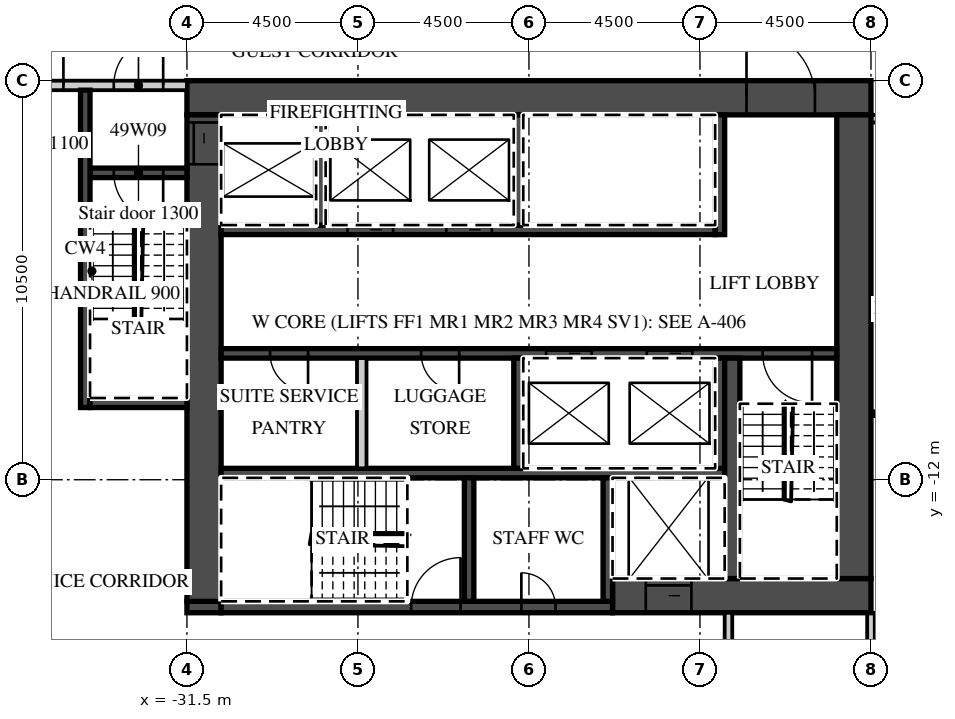
"""IFC4 building model, lengths in metres.
Left out: names, types, materials, properties, quantities, classifications, styles, units other than length and angle.
Written with IfcOpenShell. Run it as: python <this file> out.ifc"""

import sys

from ifc_helpers import new_model, si_unit, direction, frame, frame_2d, origin, place, context, subcontext, project, spatial, rectangle, extrude, element, fill, save


model = new_model("IFC4")
c1 = context("Model", 3, precision=1e-05, world=origin(), true_north=direction((0.0, 1.0)))
c2 = subcontext(c1, "Body", "Model", "MODEL_VIEW")
j1 = project(units=[si_unit("LENGTHUNIT", "METRE"), si_unit("PLANEANGLEUNIT", "RADIAN")], contexts=[c1])
p1 = place(None, origin())
s1 = spatial("IfcSite", under=j1, at=p1, CompositionType="ELEMENT")
p2 = place(p1, origin())
s2 = spatial("IfcBuilding", under=s1, at=p2, CompositionType="ELEMENT")
p3 = place(p2, frame((0.0, 0.0, 203.2)))
s3 = spatial("IfcBuildingStorey", under=s2, at=p3, CompositionType="ELEMENT", Elevation=203.2)
p4 = place(p3, frame((-13.5, -22.3, 0.0), z_axis=(0.0, 0.0, 1.0), x_axis=(0.0, 1.0, 0.0)))
e1 = element("IfcWall", 1, at=p4, inside=s3, PredefinedType="PARTITIONING", context=c2, shape_type="SweptSolid", body=[
    extrude(rectangle(XDim=6.8, YDim=0.2, at=frame_2d((3.4, 0.0))), origin(), (0.0, 0.0, 1.0), 3.0),
])
p5 = place(p3, frame((-13.5, -2.5, 0.0), z_axis=(0.0, 0.0, 1.0), x_axis=(1.0, 0.0, 0.0)))
e2 = element("IfcWall", 2, at=p5, inside=s3, PredefinedType="PARTITIONING", context=c2, shape_type="SweptSolid", body=[
    extrude(rectangle(XDim=27.0, YDim=0.2, at=frame_2d((13.5, 0.0))), origin(), (0.0, 0.0, 1.0), 3.0),
])
p6 = place(p5, frame((2.925, 0.0, 0.0)))
e3 = element("IfcOpeningElement", 3, at=p6, cuts=e2, PredefinedType="OPENING", context=c2, shape_type="SweptSolid", body=[
    extrude(rectangle(XDim=1.0, YDim=2.1, at=frame_2d((0.5, 1.05))), frame((0.0, 0.11, 0.0), z_axis=(0.0, -1.0, 0.0), x_axis=(1.0, 0.0, 0.0)), (0.0, 0.0, 1.0), 0.22),
])
p7 = place(p5, frame((5.075, 0.0, 0.0)))
e4 = element("IfcOpeningElement", 4, at=p7, cuts=e2, PredefinedType="OPENING", context=c2, shape_type="SweptSolid", body=[
    extrude(rectangle(XDim=1.0, YDim=2.1, at=frame_2d((0.5, 1.05))), frame((0.0, 0.11, 0.0), z_axis=(0.0, -1.0, 0.0), x_axis=(1.0, 0.0, 0.0)), (0.0, 0.0, 1.0), 0.22),
])
p8 = place(p5, frame((11.925, 0.0, 0.0)))
e5 = element("IfcOpeningElement", 5, at=p8, cuts=e2, PredefinedType="OPENING", context=c2, shape_type="SweptSolid", body=[
    extrude(rectangle(XDim=1.0, YDim=2.1, at=frame_2d((0.5, 1.05))), frame((0.0, 0.11, 0.0), z_axis=(0.0, -1.0, 0.0), x_axis=(1.0, 0.0, 0.0)), (0.0, 0.0, 1.0), 0.22),
])
p9 = place(p5, frame((15.938, 0.0, 0.0)))
e6 = element("IfcOpeningElement", 6, at=p9, cuts=e2, PredefinedType="OPENING", context=c2, shape_type="SweptSolid", body=[
    extrude(rectangle(XDim=1.2, YDim=2.1, at=frame_2d((0.6, 1.05))), frame((0.0, 0.11, 0.0), z_axis=(0.0, -1.0, 0.0), x_axis=(1.0, 0.0, 0.0)), (0.0, 0.0, 1.0), 0.22),
])
p10 = place(p5, frame((25.425, 0.0, 0.0)))
e7 = element("IfcOpeningElement", 7, at=p10, cuts=e2, PredefinedType="OPENING", context=c2, shape_type="SweptSolid", body=[
    extrude(rectangle(XDim=1.0, YDim=2.1, at=frame_2d((0.5, 1.05))), frame((0.0, 0.11, 0.0), z_axis=(0.0, -1.0, 0.0), x_axis=(1.0, 0.0, 0.0)), (0.0, 0.0, 1.0), 0.22),
])
p11 = place(p3, frame((-31.5, -1.95, 0.0), z_axis=(0.0, 0.0, 1.0), x_axis=(1.0, 0.0, 0.0)))
e8 = element("IfcWall", 8, at=p11, inside=s3, PredefinedType="SHEAR", context=c2, shape_type="SweptSolid", body=[
    extrude(rectangle(XDim=18.0, YDim=0.9, at=frame_2d((9.0, 0.0))), origin(), (0.0, 0.0, 1.0), 3.0),
])
p12 = place(p11, frame((14.725, 0.0, 0.0)))
e9 = element("IfcOpeningElement", 9, at=p12, cuts=e8, PredefinedType="OPENING", context=c2, shape_type="SweptSolid", body=[
    extrude(rectangle(XDim=1.8, YDim=2.1, at=frame_2d((0.9, 1.05))), frame((0.0, 0.46, 0.0), z_axis=(0.0, -1.0, 0.0), x_axis=(1.0, 0.0, 0.0)), (0.0, 0.0, 1.0), 0.92),
])
p13 = place(p3, frame((-20.3, -15.05, 0.0), z_axis=(0.0, 0.0, 1.0), x_axis=(1.0, 0.0, 0.0)))
e10 = element("IfcWall", 10, at=p13, inside=s3, PredefinedType="SHEAR", context=c2, shape_type="SweptSolid", body=[
    extrude(rectangle(XDim=6.8, YDim=0.9, at=frame_2d((3.4, 0.0))), origin(), (0.0, 0.0, 1.0), 3.0),
])
p14 = place(p13, frame((0.875, 0.0, 0.0)))
e11 = element("IfcOpeningElement", 11, at=p14, cuts=e10, PredefinedType="OPENING", context=c2, shape_type="SweptSolid", body=[
    extrude(rectangle(XDim=1.2, YDim=2.1, at=frame_2d((0.6, 1.05))), frame((0.0, 0.46, 0.0), z_axis=(0.0, -1.0, 0.0), x_axis=(1.0, 0.0, 0.0)), (0.0, 0.0, 1.0), 0.92),
])
p15 = place(p3, frame((-31.5, -15.35, 0.0), z_axis=(0.0, 0.0, 1.0), x_axis=(1.0, 0.0, 0.0)))
e12 = element("IfcWall", 12, at=p15, inside=s3, PredefinedType="SHEAR", context=c2, shape_type="SweptSolid", body=[
    extrude(rectangle(XDim=0.9, YDim=0.3, at=frame_2d((0.45, 0.0))), origin(), (0.0, 0.0, 1.0), 3.0),
])
p16 = place(p3, frame((-30.6, -15.35, 0.0), z_axis=(0.0, 0.0, 1.0), x_axis=(1.0, 0.0, 0.0)))
e13 = element("IfcWall", 13, at=p16, inside=s3, PredefinedType="SHEAR", context=c2, shape_type="SweptSolid", body=[
    extrude(rectangle(XDim=10.3, YDim=0.3, at=frame_2d((5.15, 0.0))), origin(), (0.0, 0.0, 1.0), 3.0),
])
p17 = place(p16, frame((5.0, 0.0, 0.0)))
e14 = element("IfcOpeningElement", 14, at=p17, cuts=e13, PredefinedType="OPENING", context=c2, shape_type="SweptSolid", body=[
    extrude(rectangle(XDim=1.3, YDim=2.1, at=frame_2d((0.65, 1.05))), frame((0.0, 0.16, 0.0), z_axis=(0.0, -1.0, 0.0), x_axis=(1.0, 0.0, 0.0)), (0.0, 0.0, 1.0), 0.32),
])
p18 = place(p16, frame((7.9, 0.0, 0.0)))
e15 = element("IfcOpeningElement", 15, at=p18, cuts=e13, PredefinedType="OPENING", context=c2, shape_type="SweptSolid", body=[
    extrude(rectangle(XDim=0.9, YDim=2.1, at=frame_2d((0.45, 1.05))), frame((0.0, 0.16, 0.0), z_axis=(0.0, -1.0, 0.0), x_axis=(1.0, 0.0, 0.0)), (0.0, 0.0, 1.0), 0.32),
])
p19 = place(p3, frame((-31.05, -15.2, 0.0), z_axis=(0.0, 0.0, 1.0), x_axis=(0.0, 1.0, 0.0)))
e16 = element("IfcWall", 16, at=p19, inside=s3, PredefinedType="SHEAR", context=c2, shape_type="SweptSolid", body=[
    extrude(rectangle(XDim=12.8, YDim=0.9, at=frame_2d((6.4, 0.0))), origin(), (0.0, 0.0, 1.0), 3.0),
])
p20 = place(p19, frame((11.5, 0.0, 0.0)))
e17 = element("IfcOpeningElement", 17, at=p20, cuts=e16, PredefinedType="OPENING", context=c2, shape_type="SweptSolid", body=[
    extrude(rectangle(XDim=1.1, YDim=2.1, at=frame_2d((0.55, 1.05))), frame((0.0, 0.46, 0.0), z_axis=(0.0, -1.0, 0.0), x_axis=(1.0, 0.0, 0.0)), (0.0, 0.0, 1.0), 0.92),
])
p21 = place(p3, frame((-13.95, -14.6, 0.0), z_axis=(0.0, 0.0, 1.0), x_axis=(0.0, 1.0, 0.0)))
e18 = element("IfcWall", 18, at=p21, inside=s3, PredefinedType="SHEAR", context=c2, shape_type="SweptSolid", body=[
    extrude(rectangle(XDim=12.2, YDim=0.9, at=frame_2d((6.1, 0.0))), origin(), (0.0, 0.0, 1.0), 3.0),
])
p22 = place(p3, frame((-30.6, -5.425, 0.0), z_axis=(0.0, 0.0, 1.0), x_axis=(1.0, 0.0, 0.0)))
e19 = element("IfcWall", 19, at=p22, inside=s3, PredefinedType="SHEAR", context=c2, shape_type="SweptSolid", body=[
    extrude(rectangle(XDim=13.0, YDim=0.25, at=frame_2d((6.5, 0.0))), origin(), (0.0, 0.0, 1.0), 3.0),
])
p23 = place(p22, frame((3.325, 0.0, 0.0)))
e20 = element("IfcOpeningElement", 20, at=p23, cuts=e19, PredefinedType="OPENING", context=c2, shape_type="SweptSolid", body=[
    extrude(rectangle(XDim=1.2, YDim=2.1, at=frame_2d((0.6, 1.05))), frame((0.0, 0.135, 0.0), z_axis=(0.0, -1.0, 0.0), x_axis=(1.0, 0.0, 0.0)), (0.0, 0.0, 1.0), 0.27),
])
p24 = place(p22, frame((5.925, 0.0, 0.0)))
e21 = element("IfcOpeningElement", 21, at=p24, cuts=e19, PredefinedType="OPENING", context=c2, shape_type="SweptSolid", body=[
    extrude(rectangle(XDim=1.2, YDim=2.1, at=frame_2d((0.6, 1.05))), frame((0.0, 0.135, 0.0), z_axis=(0.0, -1.0, 0.0), x_axis=(1.0, 0.0, 0.0)), (0.0, 0.0, 1.0), 0.27),
])
p25 = place(p3, frame((-17.475, -5.55, 0.0), z_axis=(0.0, 0.0, 1.0), x_axis=(0.0, 1.0, 0.0)))
e22 = element("IfcWall", 22, at=p25, inside=s3, PredefinedType="SHEAR", context=c2, shape_type="SweptSolid", body=[
    extrude(rectangle(XDim=3.15, YDim=0.25, at=frame_2d((1.575, 0.0))), origin(), (0.0, 0.0, 1.0), 3.0),
])
for number, where, z_axis, x_axis in (
    (23, (-27.975, -5.3, 0.0), (0.0, 0.0, 1.0), (0.0, 1.0, 0.0)),
    (24, (-22.775, -5.3, 0.0), (0.0, 0.0, 1.0), (0.0, 1.0, 0.0)),
):
    element("IfcWall", number, at=place(p3, frame(where, z_axis=z_axis, x_axis=x_axis)), inside=s3, PredefinedType="SHEAR", context=c2, shape_type="SweptSolid", body=[
        extrude(rectangle(XDim=2.9, YDim=0.25, at=frame_2d((1.45, 0.0))), origin(), (0.0, 0.0, 1.0), 3.0),
    ])
p26 = place(p3, frame((-30.6, -8.675, 0.0), z_axis=(0.0, 0.0, 1.0), x_axis=(1.0, 0.0, 0.0)))
e25 = element("IfcWall", 25, at=p26, inside=s3, PredefinedType="SHEAR", context=c2, shape_type="SweptSolid", body=[
    extrude(rectangle(XDim=16.2, YDim=0.25, at=frame_2d((8.1, 0.0))), origin(), (0.0, 0.0, 1.0), 3.0),
])
p27 = place(p26, frame((8.55, 0.0, 0.0)))
e26 = element("IfcOpeningElement", 26, at=p27, cuts=e25, PredefinedType="OPENING", context=c2, shape_type="SweptSolid", body=[
    extrude(rectangle(XDim=1.2, YDim=2.1, at=frame_2d((0.6, 1.05))), frame((0.0, 0.135, 0.0), z_axis=(0.0, -1.0, 0.0), x_axis=(1.0, 0.0, 0.0)), (0.0, 0.0, 1.0), 0.27),
])
p28 = place(p26, frame((11.2, 0.0, 0.0)))
e27 = element("IfcOpeningElement", 27, at=p28, cuts=e25, PredefinedType="OPENING", context=c2, shape_type="SweptSolid", body=[
    extrude(rectangle(XDim=1.2, YDim=2.1, at=frame_2d((0.6, 1.05))), frame((0.0, 0.135, 0.0), z_axis=(0.0, -1.0, 0.0), x_axis=(1.0, 0.0, 0.0)), (0.0, 0.0, 1.0), 0.27),
])
p29 = place(p26, frame((14.25, 0.0, 0.0)))
e28 = element("IfcOpeningElement", 28, at=p29, cuts=e25, PredefinedType="OPENING", context=c2, shape_type="SweptSolid", body=[
    extrude(rectangle(XDim=1.3, YDim=2.1, at=frame_2d((0.65, 1.05))), frame((0.0, 0.135, 0.0), z_axis=(0.0, -1.0, 0.0), x_axis=(1.0, 0.0, 0.0)), (0.0, 0.0, 1.0), 0.27),
])
p30 = place(p26, frame((1.288, 0.0, 0.0)))
e29 = element("IfcOpeningElement", 29, at=p30, cuts=e25, PredefinedType="OPENING", context=c2, shape_type="SweptSolid", body=[
    extrude(rectangle(XDim=1.0, YDim=2.1, at=frame_2d((0.5, 1.05))), frame((0.0, 0.135, 0.0), z_axis=(0.0, -1.0, 0.0), x_axis=(1.0, 0.0, 0.0)), (0.0, 0.0, 1.0), 0.27),
])
p31 = place(p26, frame((5.262, 0.0, 0.0)))
e30 = element("IfcOpeningElement", 30, at=p31, cuts=e25, PredefinedType="OPENING", context=c2, shape_type="SweptSolid", body=[
    extrude(rectangle(XDim=1.0, YDim=2.1, at=frame_2d((0.5, 1.05))), frame((0.0, 0.135, 0.0), z_axis=(0.0, -1.0, 0.0), x_axis=(1.0, 0.0, 0.0)), (0.0, 0.0, 1.0), 0.27),
])
p32 = place(p3, frame((-30.6, -11.825, 0.0), z_axis=(0.0, 0.0, 1.0), x_axis=(1.0, 0.0, 0.0)))
e31 = element("IfcWall", 31, at=p32, inside=s3, PredefinedType="SHEAR", context=c2, shape_type="SweptSolid", body=[
    extrude(rectangle(XDim=13.25, YDim=0.25, at=frame_2d((6.625, 0.0))), origin(), (0.0, 0.0, 1.0), 3.0),
])
for number, where, z_axis, x_axis in (
    (32, (-17.475, -11.7, 0.0), (0.0, 0.0, 1.0), (0.0, 1.0, 0.0)),
    (33, (-22.775, -11.7, 0.0), (0.0, 0.0, 1.0), (0.0, 1.0, 0.0)),
):
    element("IfcWall", number, at=place(p3, frame(where, z_axis=z_axis, x_axis=x_axis)), inside=s3, PredefinedType="SHEAR", context=c2, shape_type="SweptSolid", body=[
        extrude(rectangle(XDim=2.9, YDim=0.25, at=frame_2d((1.45, 0.0))), origin(), (0.0, 0.0, 1.0), 3.0),
    ])
p33 = place(p3, frame((-26.9, -11.7, 0.0), z_axis=(0.0, 0.0, 1.0), x_axis=(0.0, 1.0, 0.0)))
e34 = element("IfcWall", 34, at=p33, inside=s3, PredefinedType="PARTITIONING", context=c2, shape_type="SweptSolid", body=[
    extrude(rectangle(XDim=2.9, YDim=0.25, at=frame_2d((1.45, 0.0))), origin(), (0.0, 0.0, 1.0), 3.0),
])
p34 = place(p3, frame((-17.15, -14.6, 0.0), z_axis=(0.0, 0.0, 1.0), x_axis=(0.0, 1.0, 0.0)))
e35 = element("IfcWall", 35, at=p34, inside=s3, PredefinedType="SHEAR", context=c2, shape_type="SweptSolid", body=[
    extrude(rectangle(XDim=5.8, YDim=0.4, at=frame_2d((2.9, 0.0))), origin(), (0.0, 0.0, 1.0), 3.0),
])
for number, where, z_axis, x_axis in (
    (36, (-20.425, -15.2, 0.0), (0.0, 0.0, 1.0), (0.0, 1.0, 0.0)),
    (37, (-24.075, -15.2, 0.0), (0.0, 0.0, 1.0), (0.0, 1.0, 0.0)),
):
    element("IfcWall", number, at=place(p3, frame(where, z_axis=z_axis, x_axis=x_axis)), inside=s3, PredefinedType="SHEAR", context=c2, shape_type="SweptSolid", body=[
        extrude(rectangle(XDim=3.25, YDim=0.25, at=frame_2d((1.625, 0.0))), origin(), (0.0, 0.0, 1.0), 3.0),
    ])
p35 = place(p3, frame((-42.632, -1.625, 0.0), z_axis=(0.0, 0.0, 1.0), x_axis=(1.0, 0.0, 0.0)))
e38 = element("IfcWall", 38, at=p35, inside=s3, PredefinedType="PARTITIONING", context=c2, shape_type="SweptSolid", body=[
    extrude(rectangle(XDim=11.132, YDim=0.25, at=frame_2d((5.566, 0.0))), origin(), (0.0, 0.0, 1.0), 3.0),
])
p36 = place(p35, frame((9.207, 0.0, 0.0)))
e39 = element("IfcOpeningElement", 39, at=p36, cuts=e38, PredefinedType="OPENING", context=c2, shape_type="SweptSolid", body=[
    extrude(rectangle(XDim=1.3, YDim=2.1, at=frame_2d((0.65, 1.05))), frame((0.0, 0.135, 0.0), z_axis=(0.0, -1.0, 0.0), x_axis=(1.0, 0.0, 0.0)), (0.0, 0.0, 1.0), 0.27),
])
p37 = place(p35, frame((6.781, 0.0, 0.0)))
e40 = element("IfcOpeningElement", 40, at=p37, cuts=e38, PredefinedType="OPENING", context=c2, shape_type="SweptSolid", body=[
    extrude(rectangle(XDim=1.1, YDim=2.1, at=frame_2d((0.55, 1.05))), frame((0.0, 0.135, 0.0), z_axis=(0.0, -1.0, 0.0), x_axis=(1.0, 0.0, 0.0)), (0.0, 0.0, 1.0), 0.27),
])
p38 = place(p3, frame((-34.05, -3.925, 0.0), z_axis=(0.0, 0.0, 1.0), x_axis=(1.0, 0.0, 0.0)))
e41 = element("IfcWall", 41, at=p38, inside=s3, PredefinedType="SHEAR", context=c2, shape_type="SweptSolid", body=[
    extrude(rectangle(XDim=2.55, YDim=0.25, at=frame_2d((1.275, 0.0))), origin(), (0.0, 0.0, 1.0), 3.0),
])
p39 = place(p38, frame((0.625, 0.0, 0.0)))
e42 = element("IfcOpeningElement", 42, at=p39, cuts=e41, PredefinedType="OPENING", context=c2, shape_type="SweptSolid", body=[
    extrude(rectangle(XDim=1.3, YDim=2.1, at=frame_2d((0.65, 1.05))), frame((0.0, 0.135, 0.0), z_axis=(0.0, -1.0, 0.0), x_axis=(1.0, 0.0, 0.0)), (0.0, 0.0, 1.0), 0.27),
])
p40 = place(p3, frame((-34.175, -10.1, 0.0), z_axis=(0.0, 0.0, 1.0), x_axis=(0.0, 1.0, 0.0)))
e43 = element("IfcWall", 43, at=p40, inside=s3, PredefinedType="SHEAR", context=c2, shape_type="SweptSolid", body=[
    extrude(rectangle(XDim=8.35, YDim=0.25, at=frame_2d((4.175, 0.0))), origin(), (0.0, 0.0, 1.0), 3.0),
])
p41 = place(p3, frame((-34.05, -9.975, 0.0), z_axis=(0.0, 0.0, 1.0), x_axis=(1.0, 0.0, 0.0)))
e44 = element("IfcWall", 44, at=p41, inside=s3, PredefinedType="SHEAR", context=c2, shape_type="SweptSolid", body=[
    extrude(rectangle(XDim=2.55, YDim=0.25, at=frame_2d((1.275, 0.0))), origin(), (0.0, 0.0, 1.0), 3.0),
])
p42 = place(p3, frame((-17.25, -17.7, 0.0), z_axis=(0.0, 0.0, 1.0), x_axis=(0.0, 1.0, 0.0)))
e45 = element("IfcWall", 45, at=p42, inside=s3, PredefinedType="PARTITIONING", context=c2, shape_type="SweptSolid", body=[
    extrude(rectangle(XDim=2.2, YDim=0.2, at=frame_2d((1.1, 0.0))), origin(), (0.0, 0.0, 1.0), 3.0),
])
p43 = place(p27, origin())
e46 = element("IfcDoor", 46, at=p43, inside=s3, OperationType="SLIDING_TO_LEFT", PredefinedType="DOOR", context=c2, shape_type="SweptSolid", body=[
    extrude(rectangle(XDim=1.2, YDim=2.1, at=frame_2d((0.6, 1.05))), frame((0.0, 0.025, 0.0), z_axis=(0.0, -1.0, 0.0), x_axis=(1.0, 0.0, 0.0)), (0.0, 0.0, 1.0), 0.05),
])
fill(e26, e46)
p44 = place(p28, origin())
e47 = element("IfcDoor", 47, at=p44, inside=s3, OperationType="SLIDING_TO_RIGHT", PredefinedType="DOOR", context=c2, shape_type="SweptSolid", body=[
    extrude(rectangle(XDim=1.2, YDim=2.1, at=frame_2d((0.6, 1.05))), frame((0.0, 0.025, 0.0), z_axis=(0.0, -1.0, 0.0), x_axis=(1.0, 0.0, 0.0)), (0.0, 0.0, 1.0), 0.05),
])
fill(e27, e47)
p45 = place(p23, origin())
e48 = element("IfcDoor", 48, at=p45, inside=s3, OperationType="SLIDING_TO_RIGHT", PredefinedType="DOOR", context=c2, shape_type="SweptSolid", body=[
    extrude(rectangle(XDim=1.2, YDim=2.1, at=frame_2d((0.6, 1.05))), frame((0.0, 0.025, 0.0), z_axis=(0.0, -1.0, 0.0), x_axis=(1.0, 0.0, 0.0)), (0.0, 0.0, 1.0), 0.05),
])
fill(e20, e48)
p46 = place(p24, origin())
e49 = element("IfcDoor", 49, at=p46, inside=s3, OperationType="SLIDING_TO_RIGHT", PredefinedType="DOOR", context=c2, shape_type="SweptSolid", body=[
    extrude(rectangle(XDim=1.2, YDim=2.1, at=frame_2d((0.6, 1.05))), frame((0.0, 0.025, 0.0), z_axis=(0.0, -1.0, 0.0), x_axis=(1.0, 0.0, 0.0)), (0.0, 0.0, 1.0), 0.05),
])
fill(e21, e49)
p47 = place(p14, origin())
e50 = element("IfcDoor", 50, at=p47, inside=s3, OperationType="SLIDING_TO_LEFT", PredefinedType="DOOR", context=c2, shape_type="SweptSolid", body=[
    extrude(rectangle(XDim=1.2, YDim=2.1, at=frame_2d((0.6, 1.05))), frame((0.0, 0.025, 0.0), z_axis=(0.0, -1.0, 0.0), x_axis=(1.0, 0.0, 0.0)), (0.0, 0.0, 1.0), 0.05),
])
fill(e11, e50)
p48 = place(p20, origin())
e51 = element("IfcDoor", 51, at=p48, inside=s3, OperationType="SLIDING_TO_RIGHT", PredefinedType="DOOR", context=c2, shape_type="SweptSolid", body=[
    extrude(rectangle(XDim=1.1, YDim=2.1, at=frame_2d((0.55, 1.05))), frame((0.0, 0.025, 0.0), z_axis=(0.0, -1.0, 0.0), x_axis=(1.0, 0.0, 0.0)), (0.0, 0.0, 1.0), 0.05),
])
fill(e17, e51)
p49 = place(p12, origin())
e52 = element("IfcDoor", 52, at=p49, inside=s3, OperationType="DOUBLE_DOOR_DOUBLE_SWING", PredefinedType="DOOR", context=c2, shape_type="SweptSolid", body=[
    extrude(rectangle(XDim=1.8, YDim=2.1, at=frame_2d((0.9, 1.05))), frame((0.0, 0.025, 0.0), z_axis=(0.0, -1.0, 0.0), x_axis=(1.0, 0.0, 0.0)), (0.0, 0.0, 1.0), 0.05),
])
fill(e9, e52)
p50 = place(p36, origin())
e53 = element("IfcDoor", 53, at=p50, inside=s3, OperationType="SINGLE_SWING_RIGHT", PredefinedType="DOOR", context=c2, shape_type="SweptSolid", body=[
    extrude(rectangle(XDim=1.3, YDim=2.1, at=frame_2d((0.65, 1.05))), frame((0.0, 0.025, 0.0), z_axis=(0.0, -1.0, 0.0), x_axis=(1.0, 0.0, 0.0)), (0.0, 0.0, 1.0), 0.05),
])
fill(e39, e53)
p51 = place(p39, origin())
e54 = element("IfcDoor", 54, at=p51, inside=s3, OperationType="SINGLE_SWING_RIGHT", PredefinedType="DOOR", context=c2, shape_type="SweptSolid", body=[
    extrude(rectangle(XDim=1.3, YDim=2.1, at=frame_2d((0.65, 1.05))), frame((0.0, 0.025, 0.0), z_axis=(0.0, -1.0, 0.0), x_axis=(1.0, 0.0, 0.0)), (0.0, 0.0, 1.0), 0.05),
])
fill(e42, e54)
p52 = place(p37, origin())
e55 = element("IfcDoor", 55, at=p52, inside=s3, OperationType="SINGLE_SWING_RIGHT", PredefinedType="DOOR", context=c2, shape_type="SweptSolid", body=[
    extrude(rectangle(XDim=1.1, YDim=2.1, at=frame_2d((0.55, 1.05))), frame((0.0, 0.025, 0.0), z_axis=(0.0, -1.0, 0.0), x_axis=(1.0, 0.0, 0.0)), (0.0, 0.0, 1.0), 0.05),
])
fill(e40, e55)
p53 = place(p29, origin())
e56 = element("IfcDoor", 56, at=p53, inside=s3, OperationType="SINGLE_SWING_RIGHT", PredefinedType="DOOR", context=c2, shape_type="SweptSolid", body=[
    extrude(rectangle(XDim=1.3, YDim=2.1, at=frame_2d((0.65, 1.05))), frame((0.0, 0.025, 0.0), z_axis=(0.0, -1.0, 0.0), x_axis=(1.0, 0.0, 0.0)), (0.0, 0.0, 1.0), 0.05),
])
fill(e28, e56)
p54 = place(p17, origin())
e57 = element("IfcDoor", 57, at=p54, inside=s3, OperationType="SINGLE_SWING_RIGHT", PredefinedType="DOOR", context=c2, shape_type="SweptSolid", body=[
    extrude(rectangle(XDim=1.3, YDim=2.1, at=frame_2d((0.65, 1.05))), frame((0.0, 0.025, 0.0), z_axis=(0.0, -1.0, 0.0), x_axis=(1.0, 0.0, 0.0)), (0.0, 0.0, 1.0), 0.05),
])
fill(e14, e57)
p55 = place(p18, origin())
e58 = element("IfcDoor", 58, at=p55, inside=s3, OperationType="SINGLE_SWING_LEFT", PredefinedType="DOOR", context=c2, shape_type="SweptSolid", body=[
    extrude(rectangle(XDim=0.9, YDim=2.1, at=frame_2d((0.45, 1.05))), frame((0.0, 0.025, 0.0), z_axis=(0.0, -1.0, 0.0), x_axis=(1.0, 0.0, 0.0)), (0.0, 0.0, 1.0), 0.05),
])
fill(e15, e58)
p56 = place(p30, origin())
e59 = element("IfcDoor", 59, at=p56, inside=s3, OperationType="SINGLE_SWING_RIGHT", PredefinedType="DOOR", context=c2, shape_type="SweptSolid", body=[
    extrude(rectangle(XDim=1.0, YDim=2.1, at=frame_2d((0.5, 1.05))), frame((0.0, 0.025, 0.0), z_axis=(0.0, -1.0, 0.0), x_axis=(1.0, 0.0, 0.0)), (0.0, 0.0, 1.0), 0.05),
])
fill(e29, e59)
p57 = place(p31, origin())
e60 = element("IfcDoor", 60, at=p57, inside=s3, OperationType="SINGLE_SWING_RIGHT", PredefinedType="DOOR", context=c2, shape_type="SweptSolid", body=[
    extrude(rectangle(XDim=1.0, YDim=2.1, at=frame_2d((0.5, 1.05))), frame((0.0, 0.025, 0.0), z_axis=(0.0, -1.0, 0.0), x_axis=(1.0, 0.0, 0.0)), (0.0, 0.0, 1.0), 0.05),
])
fill(e30, e60)
save(model, sys.argv[1])
